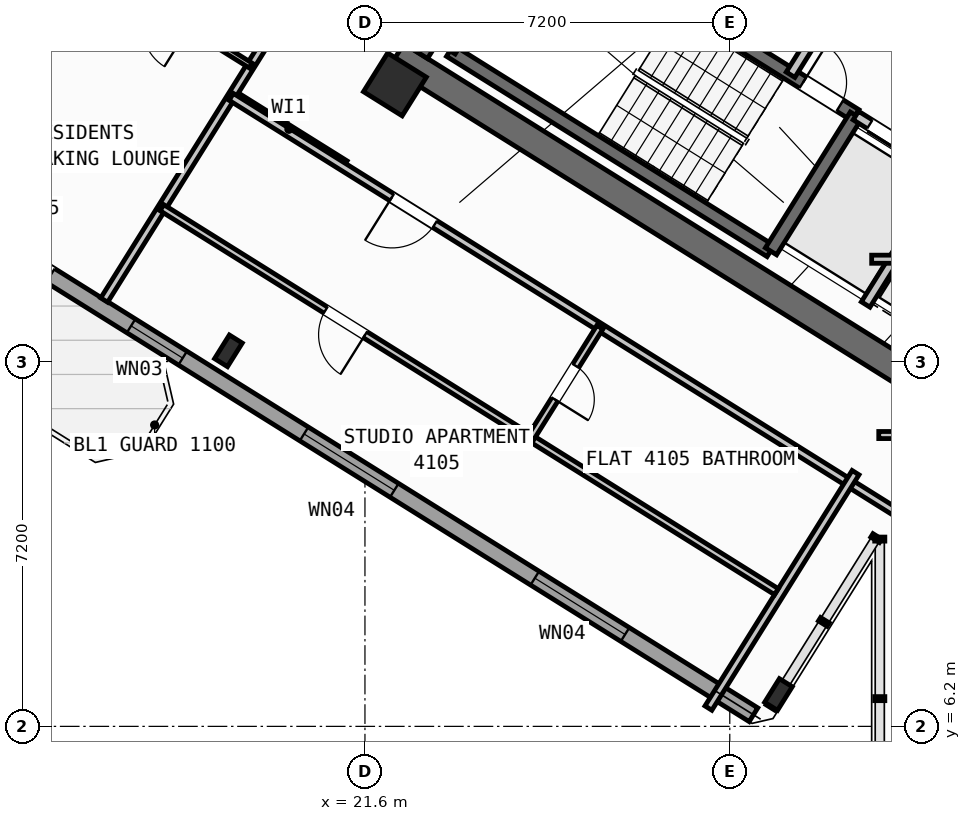
"""IFC4 building model, lengths in metres.
Left out: names, types, materials, properties, quantities, classifications, styles, units other than length and angle.
Written with IfcOpenShell. Run it as: python <this file> out.ifc"""

import sys

from ifc_helpers import new_model, si_unit, direction, frame, frame_2d, origin, origin_2d, place, context, subcontext, project, spatial, rectangle, hollow_rectangle, i_section, extrude, source, transform, mapped, element, fill, save


model = new_model("IFC4")
c1 = context("Model", 3, precision=1e-05, world=origin(), true_north=direction((0.0, 1.0)))
c2 = subcontext(c1, "Body", "Model", "MODEL_VIEW")
j1 = project(units=[si_unit("LENGTHUNIT", "METRE"), si_unit("PLANEANGLEUNIT", "RADIAN")], contexts=[c1])
p1 = place(None, origin())
s1 = spatial("IfcSite", under=j1, at=p1, CompositionType="ELEMENT")
p2 = place(p1, origin())
s2 = spatial("IfcBuilding", under=s1, at=p2, CompositionType="ELEMENT")
p3 = place(p2, frame((0.0, 0.0, 162.3)))
s3 = spatial("IfcBuildingStorey", under=s2, at=p3, CompositionType="ELEMENT", Elevation=162.3)
p4 = place(p3, frame((33.366, 12.477, 0.0), z_axis=(0.0, 0.0, 1.0), x_axis=(-0.848047359947, 0.529920442413, 0.0)))
e1 = element("IfcWall", 1, at=p4, inside=s3, PredefinedType="SHEAR", context=c2, shape_type="SweptSolid", body=[
    extrude(rectangle(XDim=13.14, YDim=0.55, at=frame_2d((6.57, 0.0))), origin(), (0.0, 0.0, 1.0), 3.35),
])
p5 = place(p3, frame((26.007, 24.976, 0.0), z_axis=(0.0, 0.0, 1.0), x_axis=(-0.529923795287, -0.848045264823, 0.0)))
e2 = element("IfcWall", 2, at=p5, inside=s3, PredefinedType="SHEAR", context=c2, shape_type="SweptSolid", body=[
    extrude(rectangle(XDim=6.425, YDim=0.55, at=frame_2d((3.212, 0.0))), origin(), (0.0, 0.0, 1.0), 3.35),
])
m1 = source(origin(), c2, "Body", "SweptSolid", [
    extrude(i_section(OverallWidth=0.3, OverallDepth=0.55, WebThickness=0.015, FlangeThickness=0.029, at=origin_2d()), origin(), (0.0, 0.0, 1.0), 3.6),
])
p6 = place(p3, frame((29.761, 6.829, 0.0), z_axis=(0.0, 0.0, 1.0), x_axis=(-0.848048096156, 0.529919264233, 0.0)))
e3 = element("IfcColumn", 3, at=p6, inside=s3, PredefinedType="COLUMN", context=c2, shape_type="MappedRepresentation", body=[
    mapped(m1, transform((0.0, 0.0, 0.0), scale=1.0)),
])
m2 = source(origin(), c2, "Body", "SweptSolid", [
    extrude(hollow_rectangle(XDim=0.9, YDim=0.9, WallThickness=0.036, at=origin_2d()), origin(), (0.0, 0.0, 1.0), 3.6),
])
p7 = place(p3, frame((22.191, 18.87, 0.0), z_axis=(0.0, 0.0, 1.0), x_axis=(-0.848048096156, 0.529919264233, 0.0)))
e4 = element("IfcColumn", 4, at=p7, inside=s3, PredefinedType="COLUMN", context=c2, shape_type="MappedRepresentation", body=[
    mapped(m2, transform((0.0, 0.0, 0.0), scale=1.0)),
])
p8 = place(p3, frame((18.906, 13.612, 0.0), z_axis=(0.0, 0.0, 1.0), x_axis=(-0.848048096156, 0.529919264233, 0.0)))
e5 = element("IfcColumn", 5, at=p8, inside=s3, PredefinedType="COLUMN", context=c2, shape_type="MappedRepresentation", body=[
    mapped(m1, transform((0.0, 0.0, 0.0), scale=1.0)),
])
p9 = place(p3, frame((29.268, 6.429, 0.0), z_axis=(0.0, 0.0, 1.0), x_axis=(-0.848049971435, 0.529916263149, 0.0)))
e6 = element("IfcWall", 6, at=p9, inside=s3, PredefinedType="STANDARD", context=c2, shape_type="SweptSolid", body=[
    extrude(rectangle(XDim=31.588, YDim=0.32, at=frame_2d((15.794, 0.0))), origin(), (0.0, 0.0, 1.0), 3.35),
])
p10 = place(p9, frame((16.362, 0.0, 0.0)))
e7 = element("IfcOpeningElement", 7, at=p10, cuts=e6, PredefinedType="OPENING", context=c2, shape_type="SweptSolid", body=[
    extrude(rectangle(XDim=1.2, YDim=2.15, at=frame_2d((0.6, 1.075))), frame((0.0, 0.17, 0.0), z_axis=(0.0, -1.0, 0.0), x_axis=(1.0, 0.0, 0.0)), (0.0, 0.0, 1.0), 0.34),
])
p11 = place(p9, frame((2.989, 0.0, 0.8)))
e8 = element("IfcOpeningElement", 8, at=p11, cuts=e6, PredefinedType="OPENING", context=c2, shape_type="SweptSolid", body=[
    extrude(rectangle(XDim=2.1, YDim=1.55, at=frame_2d((1.05, 0.775))), frame((0.0, 0.17, 0.0), z_axis=(0.0, -1.0, 0.0), x_axis=(1.0, 0.0, 0.0)), (0.0, 0.0, 1.0), 0.34),
])
p12 = place(p9, frame((8.359, 0.0, 0.8)))
e9 = element("IfcOpeningElement", 9, at=p12, cuts=e6, PredefinedType="OPENING", context=c2, shape_type="SweptSolid", body=[
    extrude(rectangle(XDim=2.1, YDim=1.55, at=frame_2d((1.05, 0.775))), frame((0.0, 0.17, 0.0), z_axis=(0.0, -1.0, 0.0), x_axis=(1.0, 0.0, 0.0)), (0.0, 0.0, 1.0), 0.34),
])
p13 = place(p9, frame((13.284, 0.0, 0.95)))
e10 = element("IfcOpeningElement", 10, at=p13, cuts=e6, PredefinedType="OPENING", context=c2, shape_type="SweptSolid", body=[
    extrude(rectangle(XDim=1.2, YDim=1.4, at=frame_2d((0.6, 0.7))), frame((0.0, 0.17, 0.0), z_axis=(0.0, -1.0, 0.0), x_axis=(1.0, 0.0, 0.0)), (0.0, 0.0, 1.0), 0.34),
])
p14 = place(p9, frame((20.39, 0.0, 0.95)))
e11 = element("IfcOpeningElement", 11, at=p14, cuts=e6, PredefinedType="OPENING", context=c2, shape_type="SweptSolid", body=[
    extrude(rectangle(XDim=1.2, YDim=1.4, at=frame_2d((0.6, 0.7))), frame((0.0, 0.17, 0.0), z_axis=(0.0, -1.0, 0.0), x_axis=(1.0, 0.0, 0.0)), (0.0, 0.0, 1.0), 0.34),
])
p15 = place(p9, frame((23.715, 0.0, 1.0)))
e12 = element("IfcOpeningElement", 12, at=p15, cuts=e6, PredefinedType="OPENING", context=c2, shape_type="SweptSolid", body=[
    extrude(rectangle(XDim=0.9, YDim=1.25, at=frame_2d((0.45, 0.625))), frame((0.0, 0.17, 0.0), z_axis=(0.0, -1.0, 0.0), x_axis=(1.0, 0.0, 0.0)), (0.0, 0.0, 1.0), 0.34),
])
p16 = place(p9, frame((26.106, 0.0, 0.85)))
e13 = element("IfcOpeningElement", 13, at=p16, cuts=e6, PredefinedType="OPENING", context=c2, shape_type="SweptSolid", body=[
    extrude(rectangle(XDim=1.5, YDim=1.5, at=frame_2d((0.75, 0.75))), frame((0.0, 0.17, 0.0), z_axis=(0.0, -1.0, 0.0), x_axis=(1.0, 0.0, 0.0)), (0.0, 0.0, 1.0), 0.34),
])
p17 = place(p9, frame((29.068, 0.0, 0.85)))
e14 = element("IfcOpeningElement", 14, at=p17, cuts=e6, PredefinedType="OPENING", context=c2, shape_type="SweptSolid", body=[
    extrude(rectangle(XDim=1.8, YDim=1.5, at=frame_2d((0.9, 0.75))), frame((0.0, 0.17, 0.0), z_axis=(0.0, -1.0, 0.0), x_axis=(1.0, 0.0, 0.0)), (0.0, 0.0, 1.0), 0.34),
])
p18 = place(p3, frame((29.605, 15.581, 0.0), z_axis=(0.0, 0.0, 1.0), x_axis=(-0.848036911448, 0.529937163087, 0.0)))
e15 = element("IfcWall", 15, at=p18, inside=s3, PredefinedType="SHEAR", context=c2, shape_type="SweptSolid", body=[
    extrude(rectangle(XDim=7.46, YDim=0.26, at=frame_2d((3.73, 0.0))), origin(), (0.0, 0.0, 1.0), 3.35),
])
p19 = place(p3, frame((31.28, 18.261, 0.0), z_axis=(0.0, 0.0, 1.0), x_axis=(-0.848051618787, 0.529913626805, 0.0)))
e16 = element("IfcWall", 16, at=p19, inside=s3, PredefinedType="SHEAR", context=c2, shape_type="SweptSolid", body=[
    extrude(rectangle(XDim=7.46, YDim=0.26, at=frame_2d((3.73, 0.0))), origin(), (0.0, 0.0, 1.0), 3.35),
])
p20 = place(p19, frame((0.36, 0.0, 0.0)))
e17 = element("IfcOpeningElement", 17, at=p20, cuts=e16, PredefinedType="OPENING", context=c2, shape_type="SweptSolid", body=[
    extrude(rectangle(XDim=0.86, YDim=2.05, at=frame_2d((0.43, 1.025))), frame((0.0, 0.14, 0.0), z_axis=(0.0, -1.0, 0.0), x_axis=(1.0, 0.0, 0.0)), (0.0, 0.0, 1.0), 0.28),
])
p21 = place(p3, frame((31.288, 18.256, 0.0), z_axis=(0.0, 0.0, 1.0), x_axis=(-0.529943379326, -0.848033026897, 0.0)))
e18 = element("IfcWall", 18, at=p21, inside=s3, PredefinedType="SHEAR", context=c2, shape_type="SweptSolid", body=[
    extrude(rectangle(XDim=3.16, YDim=0.26, at=frame_2d((1.58, 0.0))), origin(), (0.0, 0.0, 1.0), 3.35),
])
p22 = place(p3, frame((24.945, 22.22, 0.0), z_axis=(0.0, 0.0, 1.0), x_axis=(-0.529908658664, -0.84805472316, 0.0)))
e19 = element("IfcWall", 19, at=p22, inside=s3, PredefinedType="SHEAR", context=c2, shape_type="SweptSolid", body=[
    extrude(rectangle(XDim=3.16, YDim=0.26, at=frame_2d((1.58, 0.0))), origin(), (0.0, 0.0, 1.0), 3.35),
])
p23 = place(p3, frame((34.891, 16.005, 0.0), z_axis=(0.0, 0.0, 1.0), x_axis=(-0.848062873452, 0.529895614884, 0.0)))
e20 = element("IfcWall", 20, at=p23, inside=s3, PredefinedType="STANDARD", context=c2, shape_type="SweptSolid", body=[
    extrude(rectangle(XDim=4.248, YDim=0.2, at=frame_2d((2.124, 0.0))), origin(), (0.0, 0.0, 1.0), 3.34),
])
p24 = place(p23, frame((0.398, 0.0, 0.0)))
e21 = element("IfcOpeningElement", 21, at=p24, cuts=e20, PredefinedType="OPENING", context=c2, shape_type="SweptSolid", body=[
    extrude(rectangle(XDim=1.3, YDim=2.2, at=frame_2d((0.65, 1.1))), frame((0.0, 0.11, 0.0), z_axis=(0.0, -1.0, 0.0), x_axis=(1.0, 0.0, 0.0)), (0.0, 0.0, 1.0), 0.22),
])
p25 = place(p23, frame((2.473, 0.0, 0.0)))
e22 = element("IfcOpeningElement", 22, at=p25, cuts=e20, PredefinedType="OPENING", context=c2, shape_type="SweptSolid", body=[
    extrude(rectangle(XDim=1.45, YDim=2.25, at=frame_2d((0.725, 1.125))), frame((0.0, 0.11, 0.0), z_axis=(0.0, -1.0, 0.0), x_axis=(1.0, 0.0, 0.0)), (0.0, 0.0, 1.0), 0.22),
])
p26 = place(p3, frame((36.417, 18.447, 0.0), z_axis=(0.0, 0.0, 1.0), x_axis=(-0.848064879198, 0.529892404805, 0.0)))
e23 = element("IfcWall", 23, at=p26, inside=s3, PredefinedType="STANDARD", context=c2, shape_type="SweptSolid", body=[
    extrude(rectangle(XDim=5.768, YDim=0.2, at=frame_2d((2.884, 0.0))), origin(), (0.0, 0.0, 1.0), 3.34),
])
p27 = place(p26, frame((2.548, 0.0, 0.0)))
e24 = element("IfcOpeningElement", 24, at=p27, cuts=e23, PredefinedType="OPENING", context=c2, shape_type="SweptSolid", body=[
    extrude(rectangle(XDim=1.15, YDim=2.1, at=frame_2d((0.575, 1.05))), frame((0.0, 0.11, 0.0), z_axis=(0.0, -1.0, 0.0), x_axis=(1.0, 0.0, 0.0)), (0.0, 0.0, 1.0), 0.22),
])
p28 = place(p3, frame((33.029, 17.003, 0.0), z_axis=(0.0, 0.0, 1.0), x_axis=(-0.529916267533, -0.848049968695, 0.0)))
e25 = element("IfcWall", 25, at=p28, inside=s3, PredefinedType="STANDARD", context=c2, shape_type="SweptSolid", body=[
    extrude(rectangle(XDim=2.92, YDim=0.2, at=frame_2d((1.46, 0.0))), origin(), (0.0, 0.0, 1.0), 3.34),
])
p29 = place(p3, frame((31.525, 21.504, 0.0), z_axis=(0.0, 0.0, 1.0), x_axis=(-0.529907497854, -0.848055448493, 0.0)))
e26 = element("IfcWall", 26, at=p29, inside=s3, PredefinedType="STANDARD", context=c2, shape_type="SweptSolid", body=[
    extrude(rectangle(XDim=2.88, YDim=0.2, at=frame_2d((1.44, 0.0))), origin(), (0.0, 0.0, 1.0), 3.34),
])
p30 = place(p3, frame((21.206, 17.292, 0.0), z_axis=(0.0, 0.0, 1.0), x_axis=(-0.848050851465, 0.529914854792, 0.0)))
e27 = element("IfcWall", 27, at=p30, inside=s3, PredefinedType="PARTITIONING", context=c2, shape_type="SweptSolid", body=[
    extrude(rectangle(XDim=2.61, YDim=0.16, at=frame_2d((1.305, 0.0))), origin(), (0.0, 0.0, 1.0), 3.34),
])
p31 = place(p3, frame((23.899, 26.529, 0.0), z_axis=(0.0, 0.0, 1.0), x_axis=(-0.529917716469, -0.848049063305, 0.0)))
e28 = element("IfcWall", 28, at=p31, inside=s3, PredefinedType="PARTITIONING", context=c2, shape_type="SweptSolid", body=[
    extrude(rectangle(XDim=14.05, YDim=0.16, at=frame_2d((7.025, 0.0))), origin(), (0.0, 0.0, 1.0), 3.34),
])
p32 = place(p3, frame((16.519, 21.87, 0.0), z_axis=(0.0, 0.0, 1.0), x_axis=(-0.529922447305, -0.848046107144, 0.0)))
e29 = element("IfcWall", 29, at=p32, inside=s3, PredefinedType="PARTITIONING", context=c2, shape_type="SweptSolid", body=[
    extrude(rectangle(XDim=5.451, YDim=0.16, at=frame_2d((2.726, 0.0))), origin(), (0.0, 0.0, 1.0), 2.775),
])
p33 = place(p3, frame((19.346, 19.242, 0.0), z_axis=(0.0, 0.0, 1.0), x_axis=(-0.848059820872, 0.529900500304, 0.0)))
e30 = element("IfcWall", 30, at=p33, inside=s3, PredefinedType="PARTITIONING", context=c2, shape_type="SweptSolid", body=[
    extrude(rectangle(XDim=3.79, YDim=0.11, at=frame_2d((1.895, 0.0))), origin(), (0.0, 0.0, 1.0), 3.34),
])
p34 = place(p33, frame((1.435, 0.0, 0.0)))
e31 = element("IfcOpeningElement", 31, at=p34, cuts=e30, PredefinedType="OPENING", context=c2, shape_type="SweptSolid", body=[
    extrude(rectangle(XDim=0.92, YDim=2.08, at=frame_2d((0.46, 1.04))), frame((0.0, 0.065, 0.0), z_axis=(0.0, -1.0, 0.0), x_axis=(1.0, 0.0, 0.0)), (0.0, 0.0, 1.0), 0.13),
])
p35 = place(p3, frame((15.953, 28.452, 0.0), z_axis=(0.0, 0.0, 1.0), x_axis=(-0.529931645041, -0.848040359643, 0.0)))
e32 = element("IfcWall", 32, at=p35, inside=s3, PredefinedType="PARTITIONING", context=c2, shape_type="SweptSolid", body=[
    extrude(rectangle(XDim=11.74, YDim=0.11, at=frame_2d((5.87, 0.0))), origin(), (0.0, 0.0, 1.0), 3.34),
])
p36 = place(p35, frame((0.35, 0.0, 0.0)))
e33 = element("IfcOpeningElement", 33, at=p36, cuts=e32, PredefinedType="OPENING", context=c2, shape_type="SweptSolid", body=[
    extrude(rectangle(XDim=0.92, YDim=2.08, at=frame_2d((0.46, 1.04))), frame((0.0, 0.065, 0.0), z_axis=(0.0, -1.0, 0.0), x_axis=(1.0, 0.0, 0.0)), (0.0, 0.0, 1.0), 0.13),
])
p37 = place(p3, frame((32.164, 10.374, 0.0), z_axis=(0.0, 0.0, 1.0), x_axis=(-0.848044107957, 0.529925646633, 0.0)))
e34 = element("IfcWall", 34, at=p37, inside=s3, PredefinedType="PARTITIONING", context=c2, shape_type="SweptSolid", body=[
    extrude(rectangle(XDim=15.57, YDim=0.16, at=frame_2d((7.785, 0.0))), origin(), (0.0, 0.0, 1.0), 3.34),
])
p38 = place(p37, frame((10.83, 0.0, 0.0)))
e35 = element("IfcOpeningElement", 35, at=p38, cuts=e34, PredefinedType="OPENING", context=c2, shape_type="SweptSolid", body=[
    extrude(rectangle(XDim=1.0, YDim=2.1, at=frame_2d((0.5, 1.05))), frame((0.0, 0.09, 0.0), z_axis=(0.0, -1.0, 0.0), x_axis=(1.0, 0.0, 0.0)), (0.0, 0.0, 1.0), 0.18),
])
p39 = place(p3, frame((31.282, 11.208, 0.0), z_axis=(0.0, 0.0, 1.0), x_axis=(-0.529938869374, -0.84803584519, 0.0)))
e36 = element("IfcWall", 36, at=p39, inside=s3, PredefinedType="PARTITIONING", context=c2, shape_type="SweptSolid", body=[
    extrude(rectangle(XDim=5.48, YDim=0.16, at=frame_2d((2.74, 0.0))), origin(), (0.0, 0.0, 1.0), 3.34),
])
p40 = place(p3, frame((29.72, 8.859, 0.0), z_axis=(0.0, 0.0, 1.0), x_axis=(-0.848049134363, 0.529917602752, 0.0)))
e37 = element("IfcWall", 37, at=p40, inside=s3, PredefinedType="PLUMBINGWALL", context=c2, shape_type="SweptSolid", body=[
    extrude(rectangle(XDim=14.3, YDim=0.14, at=frame_2d((7.15, 0.0))), origin(), (0.0, 0.0, 1.0), 3.34),
])
p41 = place(p40, frame((9.57, 0.0, 0.0)))
e38 = element("IfcOpeningElement", 38, at=p41, cuts=e37, PredefinedType="OPENING", context=c2, shape_type="SweptSolid", body=[
    extrude(rectangle(XDim=0.92, YDim=2.08, at=frame_2d((0.46, 1.04))), frame((0.0, 0.08, 0.0), z_axis=(0.0, -1.0, 0.0), x_axis=(1.0, 0.0, 0.0)), (0.0, 0.0, 1.0), 0.16),
])
p42 = place(p3, frame((26.237, 14.078, 0.0), z_axis=(0.0, 0.0, 1.0), x_axis=(-0.52995640672, -0.848024885824, 0.0)))
e39 = element("IfcWall", 39, at=p42, inside=s3, PredefinedType="PLUMBINGWALL", context=c2, shape_type="SweptSolid", body=[
    extrude(rectangle(XDim=2.58, YDim=0.14, at=frame_2d((1.29, 0.0))), origin(), (0.0, 0.0, 1.0), 3.34),
])
p43 = place(p42, frame((0.9, 0.0, 0.0)))
e40 = element("IfcOpeningElement", 40, at=p43, cuts=e39, PredefinedType="OPENING", context=c2, shape_type="SweptSolid", body=[
    extrude(rectangle(XDim=0.78, YDim=2.05, at=frame_2d((0.39, 1.025))), frame((0.0, 0.08, 0.0), z_axis=(0.0, -1.0, 0.0), x_axis=(1.0, 0.0, 0.0)), (0.0, 0.0, 1.0), 0.16),
])
p44 = place(p3, frame((31.6, 15.42, 0.0), z_axis=(0.0, 0.0, 1.0), x_axis=(1.0, 0.0, 0.0)))
e41 = element("IfcWall", 41, at=p44, inside=s3, PredefinedType="PARTITIONING", context=c2, shape_type="SweptSolid", body=[
    extrude(rectangle(XDim=2.925, YDim=0.16, at=frame_2d((1.462, 0.0))), origin(), (0.0, 0.0, 1.0), 3.34),
])
p45 = place(p3, frame((31.74, 11.95, 0.0), z_axis=(0.0, 0.0, 1.0), x_axis=(1.0, 0.0, 0.0)))
e42 = element("IfcWall", 42, at=p45, inside=s3, PredefinedType="PLUMBINGWALL", context=c2, shape_type="SweptSolid", body=[
    extrude(rectangle(XDim=0.676, YDim=0.14, at=frame_2d((0.338, 0.0))), origin(), (0.0, 0.0, 1.0), 3.34),
])
m3 = source(origin(), c2, "Body", "SweptSolid", [
    extrude(rectangle(XDim=2.1, YDim=1.55, at=frame_2d((1.05, 0.775))), frame((0.0, 0.03, 0.0), z_axis=(0.0, -1.0, 0.0), x_axis=(1.0, 0.0, 0.0)), (0.0, 0.0, 1.0), 0.06),
])
p46 = place(p11, origin())
e43 = element("IfcWindow", 43, at=p46, inside=s3, PartitioningType="SINGLE_PANEL", PredefinedType="WINDOW", context=c2, shape_type="MappedRepresentation", body=[
    mapped(m3, transform((0.0, 0.0, 0.0), scale=1.0)),
])
fill(e8, e43)
p47 = place(p12, origin())
e44 = element("IfcWindow", 44, at=p47, inside=s3, PartitioningType="SINGLE_PANEL", PredefinedType="WINDOW", context=c2, shape_type="MappedRepresentation", body=[
    mapped(m3, transform((0.0, 0.0, 0.0), scale=1.0)),
])
fill(e9, e44)
m4 = source(origin(), c2, "Body", "SweptSolid", [
    extrude(rectangle(XDim=1.2, YDim=1.4, at=frame_2d((0.6, 0.7))), frame((0.0, 0.03, 0.0), z_axis=(0.0, -1.0, 0.0), x_axis=(1.0, 0.0, 0.0)), (0.0, 0.0, 1.0), 0.06),
])
p48 = place(p13, origin())
e45 = element("IfcWindow", 45, at=p48, inside=s3, PartitioningType="SINGLE_PANEL", PredefinedType="WINDOW", context=c2, shape_type="MappedRepresentation", body=[
    mapped(m4, transform((0.0, 0.0, 0.0), scale=1.0)),
])
fill(e10, e45)
m5 = source(origin(), c2, "Body", "SweptSolid", [
    extrude(rectangle(XDim=0.86, YDim=2.05, at=frame_2d((0.43, 1.025))), frame((0.0, 0.025, 0.0), z_axis=(0.0, -1.0, 0.0), x_axis=(1.0, 0.0, 0.0)), (0.0, 0.0, 1.0), 0.05),
])
p49 = place(p20, frame((0.86, 0.0, 0.0), z_axis=(0.0, 0.0, 1.0), x_axis=(-1.0, 0.0, 0.0)))
e46 = element("IfcDoor", 46, at=p49, inside=s3, OperationType="SINGLE_SWING_LEFT", PredefinedType="DOOR", context=c2, shape_type="MappedRepresentation", body=[
    mapped(m5, transform((0.0, 0.0, 0.0), scale=1.0)),
])
fill(e17, e46)
m6 = source(origin(), c2, "Body", "SweptSolid", [
    extrude(rectangle(XDim=1.45, YDim=2.25, at=frame_2d((0.725, 1.125))), frame((0.0, 0.025, 0.0), z_axis=(0.0, -1.0, 0.0), x_axis=(1.0, 0.0, 0.0)), (0.0, 0.0, 1.0), 0.05),
])
p50 = place(p25, origin())
e47 = element("IfcDoor", 47, at=p50, inside=s3, OperationType="DOUBLE_DOOR_SLIDING", PredefinedType="DOOR", context=c2, shape_type="MappedRepresentation", body=[
    mapped(m6, transform((0.0, 0.0, 0.0), scale=1.0)),
])
fill(e22, e47)
m7 = source(origin(), c2, "Body", "SweptSolid", [
    extrude(rectangle(XDim=1.0, YDim=2.1, at=frame_2d((0.5, 1.05))), frame((0.0, 0.025, 0.0), z_axis=(0.0, -1.0, 0.0), x_axis=(1.0, 0.0, 0.0)), (0.0, 0.0, 1.0), 0.05),
])
p51 = place(p38, origin())
e48 = element("IfcDoor", 48, at=p51, inside=s3, OperationType="SINGLE_SWING_RIGHT", PredefinedType="DOOR", context=c2, shape_type="MappedRepresentation", body=[
    mapped(m7, transform((0.0, 0.0, 0.0), scale=1.0)),
])
fill(e35, e48)
m8 = source(origin(), c2, "Body", "SweptSolid", [
    extrude(rectangle(XDim=0.92, YDim=2.08, at=frame_2d((0.46, 1.04))), frame((0.0, 0.025, 0.0), z_axis=(0.0, -1.0, 0.0), x_axis=(1.0, 0.0, 0.0)), (0.0, 0.0, 1.0), 0.05),
])
p52 = place(p41, origin())
e49 = element("IfcDoor", 49, at=p52, inside=s3, OperationType="SINGLE_SWING_LEFT", PredefinedType="DOOR", context=c2, shape_type="MappedRepresentation", body=[
    mapped(m8, transform((0.0, 0.0, 0.0), scale=1.0)),
])
fill(e38, e49)
m9 = source(origin(), c2, "Body", "SweptSolid", [
    extrude(rectangle(XDim=0.78, YDim=2.05, at=frame_2d((0.39, 1.025))), frame((0.0, 0.025, 0.0), z_axis=(0.0, -1.0, 0.0), x_axis=(1.0, 0.0, 0.0)), (0.0, 0.0, 1.0), 0.05),
])
p53 = place(p43, origin())
e50 = element("IfcDoor", 50, at=p53, inside=s3, OperationType="SINGLE_SWING_RIGHT", PredefinedType="DOOR", context=c2, shape_type="MappedRepresentation", body=[
    mapped(m9, transform((0.0, 0.0, 0.0), scale=1.0)),
])
fill(e40, e50)
save(model, sys.argv[1])
